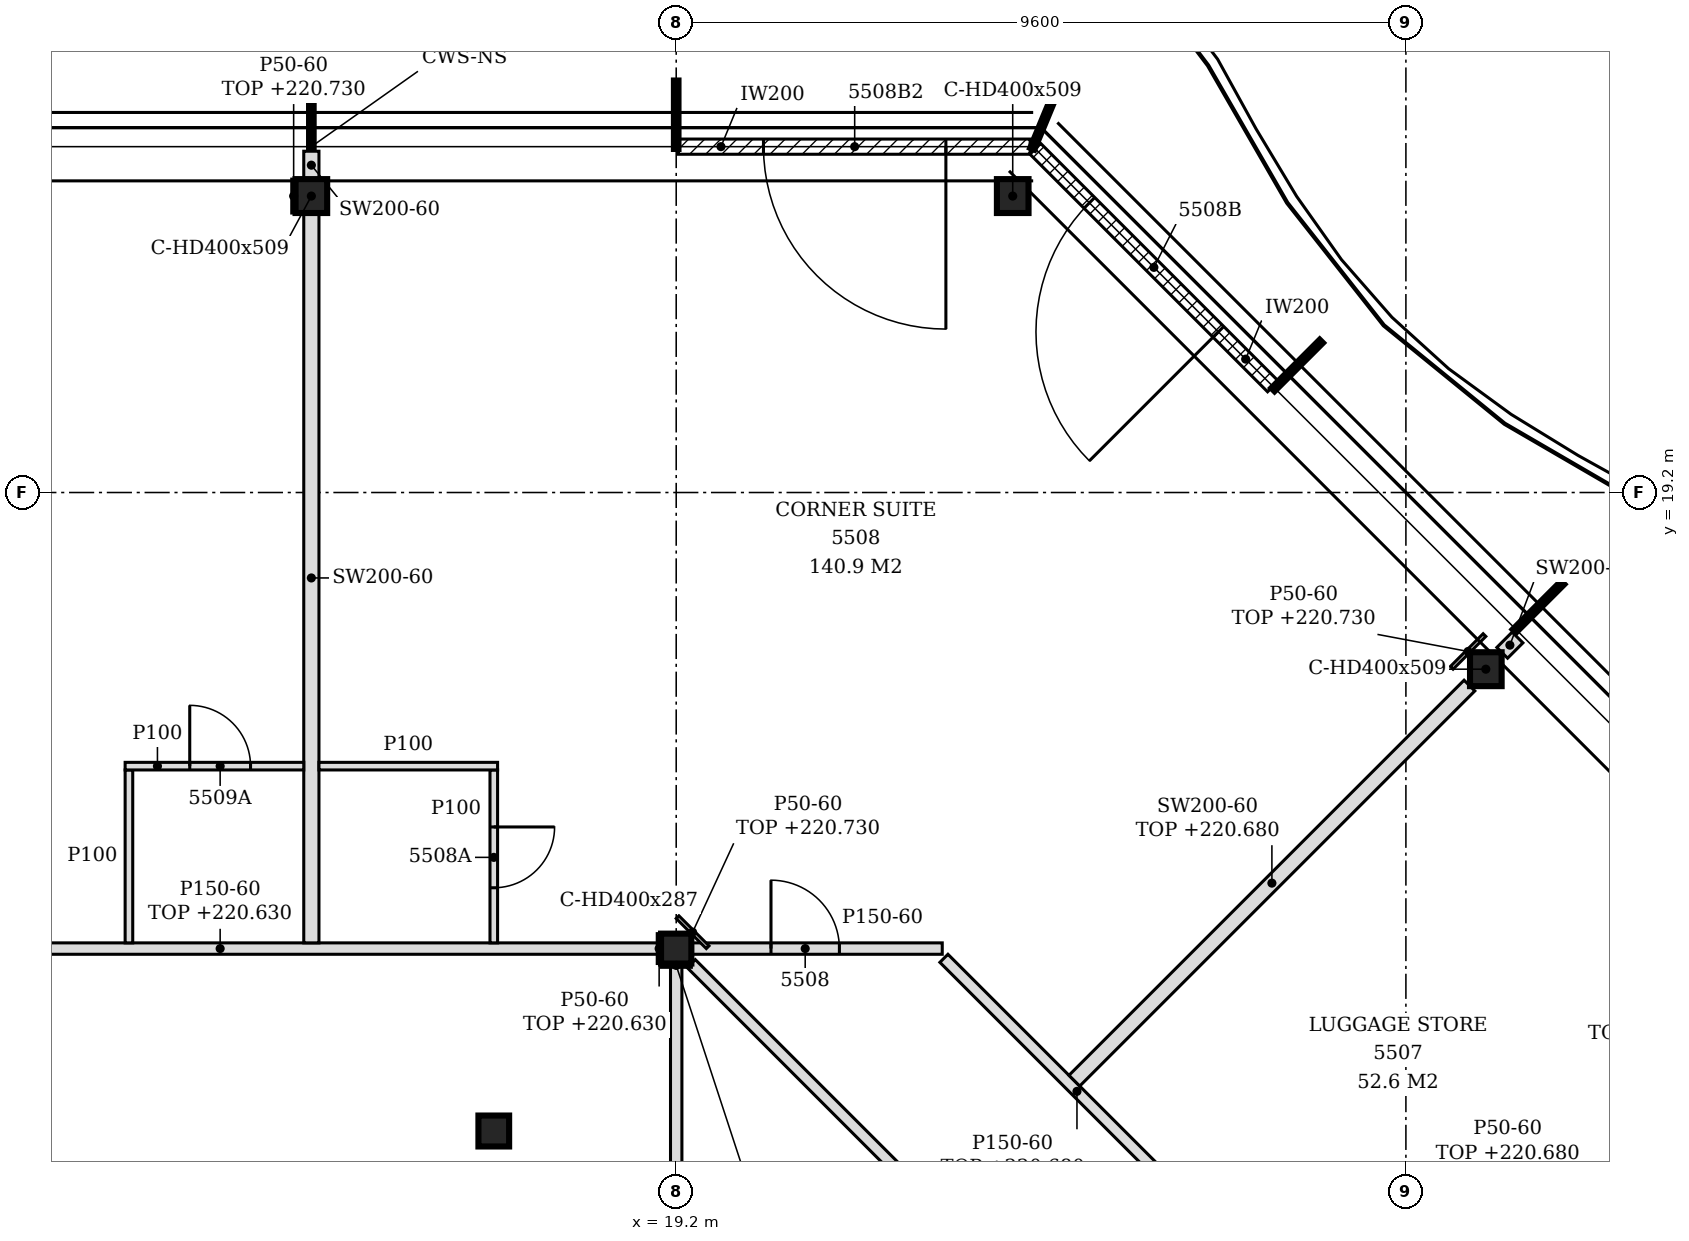
"""IFC4 building model, lengths in metres.
Left out: names, types, materials, properties, quantities, classifications, styles, units other than length and angle.
Written with IfcOpenShell. Run it as: python <this file> out.ifc"""

import sys

from ifc_helpers import new_model, si_unit, direction, frame, frame_2d, origin, origin_2d, place, context, subcontext, project, spatial, polyline, rectangle, i_section, outline, extrude, element, fill, save


model = new_model("IFC4")
c1 = context("Model", 3, precision=1e-05, world=origin(), true_north=direction((0.0, 1.0)))
c2 = subcontext(c1, "Body", "Model", "MODEL_VIEW")
j1 = project(units=[si_unit("LENGTHUNIT", "METRE"), si_unit("PLANEANGLEUNIT", "RADIAN")], contexts=[c1])
p1 = place(None, origin())
s1 = spatial("IfcSite", under=j1, at=p1, CompositionType="ELEMENT")
p2 = place(p1, origin())
s2 = spatial("IfcBuilding", under=s1, at=p2, CompositionType="ELEMENT")
p3 = place(p2, frame((0.0, 0.0, 217.8)))
s3 = spatial("IfcBuildingStorey", under=s2, at=p3, CompositionType="ELEMENT", Elevation=217.8)
for number, where, z_axis, x_axis in (
    (1, (29.852, 16.876, -0.15), (0.0, 0.0, 1.0), (1.0, 0.0, 0.0)),
    (2, (23.627, 23.1, -0.15), (0.0, 0.0, 1.0), (1.0, 0.0, 0.0)),
    (3, (14.4, 23.1, -0.15), (0.0, 0.0, 1.0), (1.0, 0.0, 0.0)),
):
    element("IfcColumn", number, at=place(p3, frame(where, z_axis=z_axis, x_axis=x_axis)), inside=s3, PredefinedType="COLUMN", context=c2, shape_type="SweptSolid", body=[
        extrude(i_section(OverallWidth=0.416, OverallDepth=0.446, WebThickness=0.039, FlangeThickness=0.063, FilletRadius=0.015, at=origin_2d()), origin(), (0.0, 0.0, 1.0), 3.6),
    ])
p4 = place(p3, frame((19.2, 13.2, -0.15), z_axis=(0.0, 0.0, 1.0), x_axis=(1.0, 0.0, 0.0)))
e4 = element("IfcColumn", 4, at=p4, inside=s3, PredefinedType="COLUMN", context=c2, shape_type="SweptSolid", body=[
    extrude(i_section(OverallWidth=0.399, OverallDepth=0.393, WebThickness=0.023, FlangeThickness=0.037, FilletRadius=0.015, at=origin_2d()), origin(), (0.0, 0.0, 1.0), 3.6),
])
p5 = place(p3, frame((16.8, 10.8, -0.15), z_axis=(0.0, 0.0, 1.0), x_axis=(1.0, 0.0, 0.0)))
e5 = element("IfcColumn", 5, at=p5, inside=s3, PredefinedType="COLUMN", context=c2, shape_type="SweptSolid", body=[
    extrude(i_section(OverallWidth=0.404, OverallDepth=0.407, WebThickness=0.027, FlangeThickness=0.044, FilletRadius=0.015, at=origin_2d()), origin(), (0.0, 0.0, 1.0), 3.6),
])
p6 = place(p3, frame((27.051, 20.596, 0.0), z_axis=(0.0, 0.0, 1.0), x_axis=(-0.707106781187, 0.707106781187, 0.0)))
e6 = element("IfcWall", 6, at=p6, inside=s3, PredefinedType="NOTDEFINED", context=c2, shape_type="SweptSolid", body=[
    extrude(rectangle(XDim=4.421, YDim=0.2, at=frame_2d((2.21, 0.0))), origin(), (0.0, 0.0, 1.0), 3.45),
])
p7 = place(p6, frame((1.015, 0.0, 0.0)))
e7 = element("IfcOpeningElement", 7, at=p7, cuts=e6, PredefinedType="OPENING", context=c2, shape_type="SweptSolid", body=[
    extrude(rectangle(XDim=2.4, YDim=2.4, at=frame_2d((1.2, 1.2))), frame((0.0, 0.11, 0.0), z_axis=(0.0, -1.0, 0.0), x_axis=(1.0, 0.0, 0.0)), (0.0, 0.0, 1.0), 0.22),
])
p8 = place(p3, frame((23.856, 23.75, 0.0), z_axis=(0.0, 0.0, 1.0), x_axis=(-1.0, 0.0, 0.0)))
e8 = element("IfcWall", 8, at=p8, inside=s3, PredefinedType="NOTDEFINED", context=c2, shape_type="SweptSolid", body=[
    extrude(rectangle(XDim=4.626, YDim=0.2, at=frame_2d((2.313, 0.0))), origin(), (0.0, 0.0, 1.0), 3.45),
])
p9 = place(p8, frame((1.108, 0.0, 0.0)))
e9 = element("IfcOpeningElement", 9, at=p9, cuts=e8, PredefinedType="OPENING", context=c2, shape_type="SweptSolid", body=[
    extrude(rectangle(XDim=2.4, YDim=2.4, at=frame_2d((1.2, 1.2))), frame((0.0, 0.11, 0.0), z_axis=(0.0, -1.0, 0.0), x_axis=(1.0, 0.0, 0.0)), (0.0, 0.0, 1.0), 0.22),
])
p10 = place(p3, frame((35.872, -0.078, 0.0), z_axis=(0.0, 0.0, 1.0), x_axis=(-0.707113345155, 0.707100217157, 0.0)))
e10 = element("IfcWall", 10, at=p10, inside=s3, PredefinedType="PARTITIONING", context=c2, shape_type="SweptSolid", body=[
    extrude(rectangle(XDim=18.597, YDim=0.15, at=frame_2d((9.298, 0.0))), origin(), (0.0, 0.0, 1.0), 2.88),
])
p11 = place(p10, frame((4.744, 0.0, 0.0)))
e11 = element("IfcOpeningElement", 11, at=p11, cuts=e10, PredefinedType="OPENING", context=c2, shape_type="SweptSolid", body=[
    extrude(rectangle(XDim=0.9, YDim=2.1, at=frame_2d((0.45, 1.05))), frame((0.0, 0.085, 0.0), z_axis=(0.0, -1.0, 0.0), x_axis=(1.0, 0.0, 0.0)), (0.0, 0.0, 1.0), 0.17),
])
p12 = place(p10, frame((8.345, 0.0, 0.0)))
e12 = element("IfcOpeningElement", 12, at=p12, cuts=e10, PredefinedType="OPENING", context=c2, shape_type="SweptSolid", body=[
    extrude(rectangle(XDim=0.9, YDim=2.1, at=frame_2d((0.45, 1.05))), frame((0.0, 0.085, 0.0), z_axis=(0.0, -1.0, 0.0), x_axis=(1.0, 0.0, 0.0)), (0.0, 0.0, 1.0), 0.17),
])
p13 = place(p10, frame((12.746, 0.0, 0.0)))
e13 = element("IfcOpeningElement", 13, at=p13, cuts=e10, PredefinedType="OPENING", context=c2, shape_type="SweptSolid", body=[
    extrude(rectangle(XDim=0.9, YDim=2.1, at=frame_2d((0.45, 1.05))), frame((0.0, 0.085, 0.0), z_axis=(0.0, -1.0, 0.0), x_axis=(1.0, 0.0, 0.0)), (0.0, 0.0, 1.0), 0.17),
])
p14 = place(p3, frame((32.272, 0.128, 0.0), z_axis=(0.0, 0.0, 1.0), x_axis=(-0.707106781187, 0.707106781187, 0.0)))
e14 = element("IfcWall", 14, at=p14, inside=s3, PredefinedType="PARTITIONING", context=c2, shape_type="SweptSolid", body=[
    extrude(rectangle(XDim=18.207, YDim=0.15, at=frame_2d((9.103, 0.0))), origin(), (0.0, 0.0, 1.0), 2.88),
])
p15 = place(p14, frame((8.703, 0.0, 0.0)))
e15 = element("IfcOpeningElement", 15, at=p15, cuts=e14, PredefinedType="OPENING", context=c2, shape_type="SweptSolid", body=[
    extrude(rectangle(XDim=0.9, YDim=2.1, at=frame_2d((0.45, 1.05))), frame((0.0, 0.085, 0.0), z_axis=(0.0, -1.0, 0.0), x_axis=(1.0, 0.0, 0.0)), (0.0, 0.0, 1.0), 0.17),
])
p16 = place(p3, frame((19.2, 2.596, 0.0), z_axis=(0.0, 0.0, 1.0), x_axis=(0.0, 1.0, 0.0)))
e16 = element("IfcWall", 16, at=p16, inside=s3, PredefinedType="PARTITIONING", context=c2, shape_type="SweptSolid", body=[
    extrude(rectangle(XDim=10.407, YDim=0.15, at=frame_2d((5.204, 0.0))), origin(), (0.0, 0.0, 1.0), 2.83),
])
p17 = place(p3, frame((30.662, 5.238, 0.0), z_axis=(0.0, 0.0, 1.0), x_axis=(0.707106781187, 0.707106781187, 0.0)))
e17 = element("IfcWall", 17, at=p17, inside=s3, PredefinedType="PARTITIONING", context=c2, shape_type="SweptSolid", body=[
    extrude(rectangle(XDim=7.351, YDim=0.2, at=frame_2d((3.676, 0.0))), origin(), (0.0, 0.0, 1.0), 2.93),
])
p18 = place(p3, frame((31.398, 9.798, 0.0), z_axis=(0.0, 0.0, 1.0), x_axis=(0.707133900936, 0.707079660397, 0.0)))
e18 = element("IfcWall", 18, at=p18, inside=s3, PredefinedType="PARTITIONING", context=c2, shape_type="SweptSolid", body=[
    extrude(rectangle(XDim=4.501, YDim=0.2, at=frame_2d((2.25, 0.0))), origin(), (0.0, 0.0, 1.0), 2.63),
])
p19 = place(p3, frame((24.438, 11.462, 0.0), z_axis=(0.0, 0.0, 1.0), x_axis=(0.707090175614, 0.707123386369, 0.0)))
e19 = element("IfcWall", 19, at=p19, inside=s3, PredefinedType="PARTITIONING", context=c2, shape_type="SweptSolid", body=[
    extrude(rectangle(XDim=7.351, YDim=0.2, at=frame_2d((3.676, 0.0))), origin(), (0.0, 0.0, 1.0), 2.88),
])
p20 = place(p3, frame((7.399, 13.2, 0.0), z_axis=(0.0, 0.0, 1.0), x_axis=(1.0, 0.0, 0.0)))
e20 = element("IfcWall", 20, at=p20, inside=s3, PredefinedType="PARTITIONING", context=c2, shape_type="SweptSolid", body=[
    extrude(rectangle(XDim=11.601, YDim=0.15, at=frame_2d((5.801, 0.0))), origin(), (0.0, 0.0, 1.0), 2.83),
])
p21 = place(p3, frame((19.399, 13.2, 0.0), z_axis=(0.0, 0.0, 1.0), x_axis=(1.0, 0.0, 0.0)))
e21 = element("IfcWall", 21, at=p21, inside=s3, PredefinedType="PARTITIONING", context=c2, shape_type="SweptSolid", body=[
    extrude(rectangle(XDim=3.301, YDim=0.15, at=frame_2d((1.65, 0.0))), origin(), (0.0, 0.0, 1.0), 3.45),
])
p22 = place(p21, frame((1.048, 0.0, 0.0)))
e22 = element("IfcOpeningElement", 22, at=p22, cuts=e21, PredefinedType="OPENING", context=c2, shape_type="SweptSolid", body=[
    extrude(rectangle(XDim=0.9, YDim=2.1, at=frame_2d((0.45, 1.05))), frame((0.0, 0.085, 0.0), z_axis=(0.0, -1.0, 0.0), x_axis=(1.0, 0.0, 0.0)), (0.0, 0.0, 1.0), 0.17),
])
p23 = place(p3, frame((12.0, 13.275, 0.0), z_axis=(0.0, 0.0, 1.0), x_axis=(0.0, 1.0, 0.0)))
e23 = element("IfcWall", 23, at=p23, inside=s3, PredefinedType="PARTITIONING", context=c2, shape_type="SweptSolid", body=[
    extrude(outline(polyline([(0.0, 0.0), (2.275, 0.0), (2.275, 3.45), (0.075, 3.45), (0.073, 2.83), (0.0, 2.83), (0.0, 0.0)])), frame((0.0, 0.05, 0.0), z_axis=(0.0, -1.0, 0.0), x_axis=(1.0, 0.0, 0.0)), (0.0, 0.0, 1.0), 0.1),
])
p24 = place(p3, frame((14.4, 13.275, 0.0), z_axis=(0.0, 0.0, 1.0), x_axis=(0.0, 1.0, 0.0)))
e24 = element("IfcWall", 24, at=p24, inside=s3, PredefinedType="PARTITIONING", context=c2, shape_type="SweptSolid", body=[
    extrude(outline(polyline([(0.0, 0.0), (9.602, 0.0), (9.602, 3.45), (6.03, 3.45), (6.028, 2.88), (5.82, 2.88), (5.818, 3.45), (0.075, 3.45), (0.073, 2.83), (0.0, 2.83), (0.0, 0.0)])), frame((0.0, 0.1, 0.0), z_axis=(0.0, -1.0, 0.0), x_axis=(1.0, 0.0, 0.0)), (0.0, 0.0, 1.0), 0.2),
])
p25 = place(p3, frame((16.8, 13.275, 0.0), z_axis=(0.0, 0.0, 1.0), x_axis=(0.0, 1.0, 0.0)))
e25 = element("IfcWall", 25, at=p25, inside=s3, PredefinedType="PARTITIONING", context=c2, shape_type="SweptSolid", body=[
    extrude(outline(polyline([(0.0, 0.0), (2.275, 0.0), (2.275, 3.45), (0.075, 3.45), (0.073, 2.83), (0.0, 2.83), (0.0, 0.0)])), frame((0.0, 0.05, 0.0), z_axis=(0.0, -1.0, 0.0), x_axis=(1.0, 0.0, 0.0)), (0.0, 0.0, 1.0), 0.1),
])
p26 = place(p25, frame((0.725, 0.0, 0.0)))
e26 = element("IfcOpeningElement", 26, at=p26, cuts=e25, PredefinedType="OPENING", context=c2, shape_type="SweptSolid", body=[
    extrude(rectangle(XDim=0.8, YDim=2.1, at=frame_2d((0.4, 1.05))), frame((0.0, 0.06, 0.0), z_axis=(0.0, -1.0, 0.0), x_axis=(1.0, 0.0, 0.0)), (0.0, 0.0, 1.0), 0.12),
])
p27 = place(p3, frame((11.95, 15.6, 0.0), z_axis=(0.0, 0.0, 1.0), x_axis=(1.0, 0.0, 0.0)))
e27 = element("IfcWall", 27, at=p27, inside=s3, PredefinedType="PARTITIONING", context=c2, shape_type="SweptSolid", body=[
    extrude(rectangle(XDim=2.35, YDim=0.1, at=frame_2d((1.175, 0.0))), origin(), (0.0, 0.0, 1.0), 3.45),
])
p28 = place(p27, frame((0.85, 0.0, 0.0)))
e28 = element("IfcOpeningElement", 28, at=p28, cuts=e27, PredefinedType="OPENING", context=c2, shape_type="SweptSolid", body=[
    extrude(rectangle(XDim=0.8, YDim=2.1, at=frame_2d((0.4, 1.05))), frame((0.0, 0.06, 0.0), z_axis=(0.0, -1.0, 0.0), x_axis=(1.0, 0.0, 0.0)), (0.0, 0.0, 1.0), 0.12),
])
p29 = place(p3, frame((14.5, 15.6, 0.0), z_axis=(0.0, 0.0, 1.0), x_axis=(1.0, 0.0, 0.0)))
e29 = element("IfcWall", 29, at=p29, inside=s3, PredefinedType="PARTITIONING", context=c2, shape_type="SweptSolid", body=[
    extrude(rectangle(XDim=2.35, YDim=0.1, at=frame_2d((1.175, 0.0))), origin(), (0.0, 0.0, 1.0), 3.45),
])
p30 = place(p3, frame((30.067, 17.091, 0.0), z_axis=(0.0, 0.0, 1.0), x_axis=(0.707106781187, 0.707106781187, 0.0)))
e30 = element("IfcWall", 30, at=p30, inside=s3, PredefinedType="PARTITIONING", context=c2, shape_type="SweptSolid", body=[
    extrude(rectangle(XDim=0.285, YDim=0.2, at=frame_2d((0.143, 0.0))), origin(), (0.0, 0.0, 1.0), 3.45),
])
p31 = place(p3, frame((14.4, 23.323, 0.0), z_axis=(0.0, 0.0, 1.0), x_axis=(0.0, 1.0, 0.0)))
e31 = element("IfcWall", 31, at=p31, inside=s3, PredefinedType="PARTITIONING", context=c2, shape_type="SweptSolid", body=[
    extrude(rectangle(XDim=0.367, YDim=0.2, at=frame_2d((0.184, 0.0))), origin(), (0.0, 0.0, 1.0), 3.45),
])
p32 = place(p3, frame((18.976, 13.003, 0.0), z_axis=(0.0, 0.0, 1.0), x_axis=(0.0, 1.0, 0.0)))
e32 = element("IfcWall", 32, at=p32, inside=s3, PredefinedType="PARTITIONING", context=c2, shape_type="SweptSolid", body=[
    extrude(rectangle(XDim=0.393, YDim=0.05, at=frame_2d((0.197, 0.0))), origin(), (0.0, 0.0, 1.0), 2.83),
])
p33 = place(p3, frame((19.614, 13.218, 0.0), z_axis=(0.0, 0.0, 1.0), x_axis=(-0.707106781187, 0.707106781187, 0.0)))
e33 = element("IfcWall", 33, at=p33, inside=s3, PredefinedType="PARTITIONING", context=c2, shape_type="SweptSolid", body=[
    extrude(rectangle(XDim=0.56, YDim=0.05, at=frame_2d((0.28, 0.0))), origin(), (0.0, 0.0, 1.0), 2.93),
])
p34 = place(p3, frame((29.403, 16.893, 0.0), z_axis=(0.0, 0.0, 1.0), x_axis=(0.706906496032, 0.707307009627, 0.0)))
e34 = element("IfcWall", 34, at=p34, inside=s3, PredefinedType="PARTITIONING", context=c2, shape_type="SweptSolid", body=[
    extrude(rectangle(XDim=0.61, YDim=0.05, at=frame_2d((0.305, 0.0))), origin(), (0.0, 0.0, 1.0), 2.93),
])
p35 = place(p3, frame((19.0, 12.979, 0.0), z_axis=(0.0, 0.0, 1.0), x_axis=(1.0, 0.0, 0.0)))
e35 = element("IfcWall", 35, at=p35, inside=s3, PredefinedType="PARTITIONING", context=c2, shape_type="SweptSolid", body=[
    extrude(rectangle(XDim=0.399, YDim=0.05, at=frame_2d((0.199, 0.0))), origin(), (0.0, 0.0, 1.0), 2.83),
])
p36 = place(p3, frame((14.167, 22.877, 0.0), z_axis=(0.0, 0.0, 1.0), x_axis=(0.0, 1.0, 0.0)))
e36 = element("IfcWall", 36, at=p36, inside=s3, PredefinedType="PARTITIONING", context=c2, shape_type="SweptSolid", body=[
    extrude(rectangle(XDim=0.446, YDim=0.05, at=frame_2d((0.223, 0.0))), origin(), (0.0, 0.0, 1.0), 2.93),
])
p37 = place(p7, origin())
e37 = element("IfcDoor", 37, at=p37, inside=s3, OperationType="SINGLE_SWING_LEFT", PredefinedType="DOOR", context=c2, shape_type="SweptSolid", body=[
    extrude(rectangle(XDim=2.4, YDim=2.4, at=frame_2d((1.2, 1.2))), frame((0.0, 0.025, 0.0), z_axis=(0.0, -1.0, 0.0), x_axis=(1.0, 0.0, 0.0)), (0.0, 0.0, 1.0), 0.05),
])
fill(e7, e37)
p38 = place(p9, origin())
e38 = element("IfcDoor", 38, at=p38, inside=s3, OperationType="SINGLE_SWING_LEFT", PredefinedType="DOOR", context=c2, shape_type="SweptSolid", body=[
    extrude(rectangle(XDim=2.4, YDim=2.4, at=frame_2d((1.2, 1.2))), frame((0.0, 0.025, 0.0), z_axis=(0.0, -1.0, 0.0), x_axis=(1.0, 0.0, 0.0)), (0.0, 0.0, 1.0), 0.05),
])
fill(e9, e38)
p39 = place(p22, origin())
e39 = element("IfcDoor", 39, at=p39, inside=s3, OperationType="SINGLE_SWING_LEFT", PredefinedType="DOOR", context=c2, shape_type="SweptSolid", body=[
    extrude(rectangle(XDim=0.9, YDim=2.1, at=frame_2d((0.45, 1.05))), frame((0.0, 0.025, 0.0), z_axis=(0.0, -1.0, 0.0), x_axis=(1.0, 0.0, 0.0)), (0.0, 0.0, 1.0), 0.05),
])
fill(e22, e39)
p40 = place(p26, frame((0.8, 0.0, 0.0), z_axis=(0.0, 0.0, 1.0), x_axis=(-1.0, 0.0, 0.0)))
e40 = element("IfcDoor", 40, at=p40, inside=s3, OperationType="SINGLE_SWING_LEFT", PredefinedType="DOOR", context=c2, shape_type="SweptSolid", body=[
    extrude(rectangle(XDim=0.8, YDim=2.1, at=frame_2d((0.4, 1.05))), frame((0.0, 0.025, 0.0), z_axis=(0.0, -1.0, 0.0), x_axis=(1.0, 0.0, 0.0)), (0.0, 0.0, 1.0), 0.05),
])
fill(e26, e40)
p41 = place(p28, origin())
e41 = element("IfcDoor", 41, at=p41, inside=s3, OperationType="SINGLE_SWING_LEFT", PredefinedType="DOOR", context=c2, shape_type="SweptSolid", body=[
    extrude(rectangle(XDim=0.8, YDim=2.1, at=frame_2d((0.4, 1.05))), frame((0.0, 0.025, 0.0), z_axis=(0.0, -1.0, 0.0), x_axis=(1.0, 0.0, 0.0)), (0.0, 0.0, 1.0), 0.05),
])
fill(e28, e41)
save(model, sys.argv[1])
